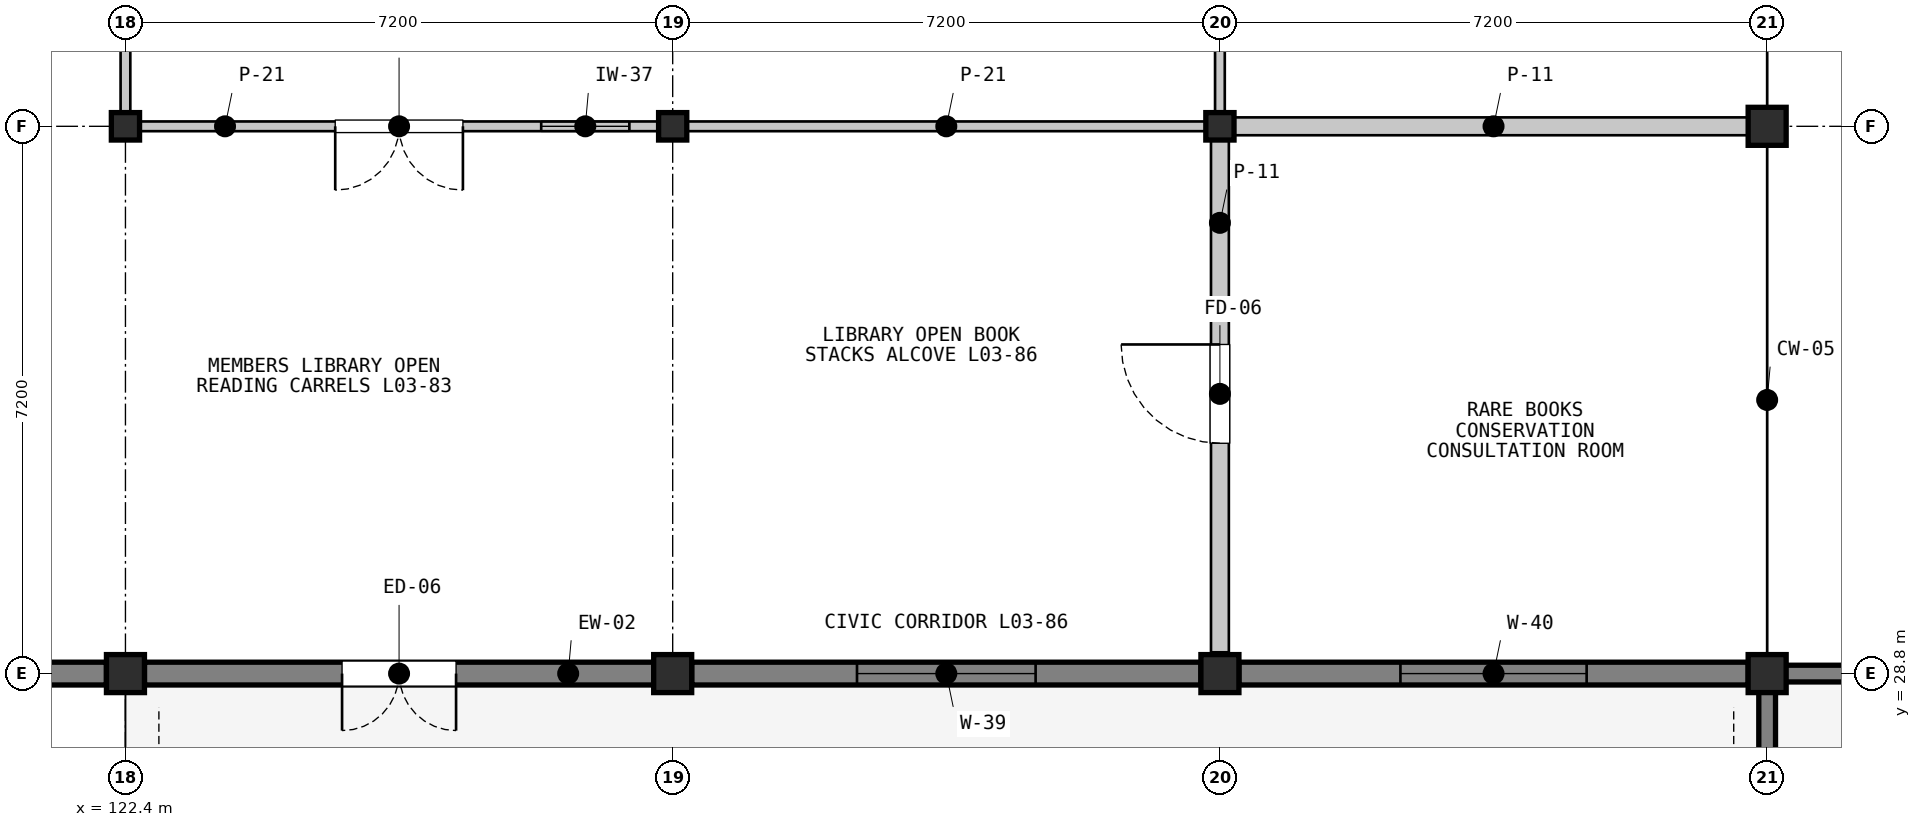
"""IFC4 building model, lengths in metres.
Left out: names, types, materials, properties, quantities, classifications, styles, units other than length and angle.
Written with IfcOpenShell. Run it as: python <this file> out.ifc"""

import sys

from ifc_helpers import new_model, si_unit, direction, frame, frame_2d, origin, origin_2d, place, context, subcontext, project, spatial, rectangle, i_section, extrude, element, fill, save


model = new_model("IFC4")
c1 = context("Model", 3, precision=1e-05, world=origin(), true_north=direction((0.0, 1.0)))
c2 = subcontext(c1, "Body", "Model", "MODEL_VIEW")
j1 = project(units=[si_unit("LENGTHUNIT", "METRE"), si_unit("PLANEANGLEUNIT", "RADIAN")], contexts=[c1])
p1 = place(None, origin())
s1 = spatial("IfcSite", under=j1, at=p1, CompositionType="ELEMENT")
p2 = place(p1, origin())
s2 = spatial("IfcBuilding", under=s1, at=p2, CompositionType="ELEMENT")
p3 = place(p2, frame((0.0, 0.0, 9.9)))
s3 = spatial("IfcBuildingStorey", under=s2, at=p3, CompositionType="ELEMENT", Elevation=9.9)
p4 = place(p3, frame((122.4, 28.8, 0.0), z_axis=(0.0, 0.0, 1.0), x_axis=(1.0, 0.0, 0.0)))
e1 = element("IfcColumn", 1, at=p4, inside=s3, PredefinedType="COLUMN", context=c2, shape_type="SweptSolid", body=[
    extrude(rectangle(XDim=0.5, YDim=0.5, at=origin_2d()), origin(), (0.0, 0.0, 1.0), 4.2),
])
p5 = place(p3, frame((122.4, 36.0, 0.0), z_axis=(0.0, 0.0, 1.0), x_axis=(1.0, 0.0, 0.0)))
e2 = element("IfcColumn", 2, at=p5, inside=s3, PredefinedType="COLUMN", context=c2, shape_type="SweptSolid", body=[
    extrude(i_section(OverallWidth=0.371, OverallDepth=0.361, WebThickness=0.012, FlangeThickness=0.02, FilletRadius=0.015, at=origin_2d()), origin(), (0.0, 0.0, 1.0), 4.2),
])
p6 = place(p3, frame((129.6, 28.8, 0.0), z_axis=(0.0, 0.0, 1.0), x_axis=(1.0, 0.0, 0.0)))
e3 = element("IfcColumn", 3, at=p6, inside=s3, PredefinedType="COLUMN", context=c2, shape_type="SweptSolid", body=[
    extrude(rectangle(XDim=0.5, YDim=0.5, at=origin_2d()), origin(), (0.0, 0.0, 1.0), 4.2),
])
p7 = place(p3, frame((129.6, 36.0, 0.0), z_axis=(0.0, 0.0, 1.0), x_axis=(1.0, 0.0, 0.0)))
e4 = element("IfcColumn", 4, at=p7, inside=s3, PredefinedType="COLUMN", context=c2, shape_type="SweptSolid", body=[
    extrude(i_section(OverallWidth=0.371, OverallDepth=0.361, WebThickness=0.012, FlangeThickness=0.02, FilletRadius=0.015, at=origin_2d()), origin(), (0.0, 0.0, 1.0), 4.2),
])
p8 = place(p3, frame((136.8, 28.8, 0.0), z_axis=(0.0, 0.0, 1.0), x_axis=(1.0, 0.0, 0.0)))
e5 = element("IfcColumn", 5, at=p8, inside=s3, PredefinedType="COLUMN", context=c2, shape_type="SweptSolid", body=[
    extrude(rectangle(XDim=0.5, YDim=0.5, at=origin_2d()), origin(), (0.0, 0.0, 1.0), 4.2),
])
p9 = place(p3, frame((136.8, 36.0, 0.0), z_axis=(0.0, 0.0, 1.0), x_axis=(1.0, 0.0, 0.0)))
e6 = element("IfcColumn", 6, at=p9, inside=s3, PredefinedType="COLUMN", context=c2, shape_type="SweptSolid", body=[
    extrude(i_section(OverallWidth=0.371, OverallDepth=0.361, WebThickness=0.012, FlangeThickness=0.02, FilletRadius=0.015, at=origin_2d()), origin(), (0.0, 0.0, 1.0), 4.2),
])
for number, where, z_axis, x_axis in (
    (7, (144.0, 28.8, 0.0), (0.0, 0.0, 1.0), (1.0, 0.0, 0.0)),
    (8, (144.0, 36.0, 0.0), (0.0, 0.0, 1.0), (1.0, 0.0, 0.0)),
):
    element("IfcColumn", number, at=place(p3, frame(where, z_axis=z_axis, x_axis=x_axis)), inside=s3, PredefinedType="COLUMN", context=c2, shape_type="SweptSolid", body=[
        extrude(rectangle(XDim=0.5, YDim=0.5, at=origin_2d()), origin(), (0.0, 0.0, 1.0), 4.2),
    ])
p10 = place(p3, frame((122.15, 28.8, 0.0), z_axis=(0.0, 0.0, 1.0), x_axis=(-1.0, 0.0, 0.0)))
e9 = element("IfcWall", 9, at=p10, inside=s3, PredefinedType="SOLIDWALL", context=c2, shape_type="SweptSolid", body=[
    extrude(rectangle(XDim=6.7, YDim=0.3, at=frame_2d((3.35, 0.0))), origin(), (0.0, 0.0, 1.0), 3.398),
])
p11 = place(p10, frame((1.008, 0.0, 0.95)))
e10 = element("IfcOpeningElement", 10, at=p11, cuts=e9, PredefinedType="OPENING", context=c2, shape_type="SweptSolid", body=[
    extrude(rectangle(XDim=1.2, YDim=1.7, at=frame_2d((0.6, 0.85))), frame((0.0, 0.16, 0.0), z_axis=(0.0, -1.0, 0.0), x_axis=(1.0, 0.0, 0.0)), (0.0, 0.0, 1.0), 0.32),
])
p12 = place(p10, frame((4.492, 0.0, 0.95)))
e11 = element("IfcOpeningElement", 11, at=p12, cuts=e9, PredefinedType="OPENING", context=c2, shape_type="SweptSolid", body=[
    extrude(rectangle(XDim=1.2, YDim=1.7, at=frame_2d((0.6, 0.85))), frame((0.0, 0.16, 0.0), z_axis=(0.0, -1.0, 0.0), x_axis=(1.0, 0.0, 0.0)), (0.0, 0.0, 1.0), 0.32),
])
p13 = place(p3, frame((129.35, 28.8, 0.0), z_axis=(0.0, 0.0, 1.0), x_axis=(-1.0, 0.0, 0.0)))
e12 = element("IfcWall", 12, at=p13, inside=s3, PredefinedType="SOLIDWALL", context=c2, shape_type="SweptSolid", body=[
    extrude(rectangle(XDim=6.7, YDim=0.3, at=frame_2d((3.35, 0.0))), origin(), (0.0, 0.0, 1.0), 3.388),
])
p14 = place(p13, frame((2.6, 0.0, 0.0)))
e13 = element("IfcOpeningElement", 13, at=p14, cuts=e12, PredefinedType="OPENING", context=c2, shape_type="SweptSolid", body=[
    extrude(rectangle(XDim=1.5, YDim=2.25, at=frame_2d((0.75, 1.125))), frame((0.0, 0.16, 0.0), z_axis=(0.0, -1.0, 0.0), x_axis=(1.0, 0.0, 0.0)), (0.0, 0.0, 1.0), 0.32),
])
p15 = place(p3, frame((136.55, 28.8, 0.0), z_axis=(0.0, 0.0, 1.0), x_axis=(-1.0, 0.0, 0.0)))
e14 = element("IfcWall", 14, at=p15, inside=s3, PredefinedType="SOLIDWALL", context=c2, shape_type="SweptSolid", body=[
    extrude(rectangle(XDim=6.7, YDim=0.3, at=frame_2d((3.35, 0.0))), origin(), (0.0, 0.0, 1.0), 3.388),
])
p16 = place(p15, frame((2.175, 0.0, 0.95)))
e15 = element("IfcOpeningElement", 15, at=p16, cuts=e14, PredefinedType="OPENING", context=c2, shape_type="SweptSolid", body=[
    extrude(rectangle(XDim=2.35, YDim=2.05, at=frame_2d((1.175, 1.025))), frame((0.0, 0.16, 0.0), z_axis=(0.0, -1.0, 0.0), x_axis=(1.0, 0.0, 0.0)), (0.0, 0.0, 1.0), 0.32),
])
p17 = place(p3, frame((143.75, 28.8, 0.0), z_axis=(0.0, 0.0, 1.0), x_axis=(-1.0, 0.0, 0.0)))
e16 = element("IfcWall", 16, at=p17, inside=s3, PredefinedType="SOLIDWALL", context=c2, shape_type="SweptSolid", body=[
    extrude(rectangle(XDim=6.7, YDim=0.3, at=frame_2d((3.35, 0.0))), origin(), (0.0, 0.0, 1.0), 3.388),
])
p18 = place(p17, frame((2.125, 0.0, 0.95)))
e17 = element("IfcOpeningElement", 17, at=p18, cuts=e16, PredefinedType="OPENING", context=c2, shape_type="SweptSolid", body=[
    extrude(rectangle(XDim=2.45, YDim=2.05, at=frame_2d((1.225, 1.025))), frame((0.0, 0.16, 0.0), z_axis=(0.0, -1.0, 0.0), x_axis=(1.0, 0.0, 0.0)), (0.0, 0.0, 1.0), 0.32),
])
p19 = place(p3, frame((144.0, 21.75, 0.0), z_axis=(0.0, 0.0, 1.0), x_axis=(0.0, 1.0, 0.0)))
e18 = element("IfcWall", 18, at=p19, inside=s3, PredefinedType="PARAPET", context=c2, shape_type="SweptSolid", body=[
    extrude(rectangle(XDim=6.9, YDim=0.22, at=frame_2d((3.45, 0.0))), origin(), (0.0, 0.0, 1.0), 0.85),
])
p20 = place(p3, frame((144.15, 28.8, 0.0), z_axis=(0.0, 0.0, 1.0), x_axis=(1.0, 0.0, 0.0)))
e19 = element("IfcWall", 19, at=p20, inside=s3, PredefinedType="PARAPET", context=c2, shape_type="SweptSolid", body=[
    extrude(rectangle(XDim=6.9, YDim=0.22, at=frame_2d((3.45, 0.0))), origin(), (0.0, 0.0, 1.0), 0.85),
])
p21 = place(p3, frame((129.48, 36.0, 0.0), z_axis=(0.0, 0.0, 1.0), x_axis=(-1.0, 0.0, 0.0)))
e20 = element("IfcWall", 20, at=p21, inside=s3, PredefinedType="PARTITIONING", context=c2, shape_type="SweptSolid", body=[
    extrude(rectangle(XDim=6.96, YDim=0.128, at=frame_2d((3.48, 0.0))), origin(), (0.0, 0.0, 1.0), 3.378),
])
p22 = place(p21, frame((2.64, 0.0, 0.0)))
e21 = element("IfcOpeningElement", 21, at=p22, cuts=e20, PredefinedType="OPENING", context=c2, shape_type="SweptSolid", body=[
    extrude(rectangle(XDim=1.68, YDim=2.35, at=frame_2d((0.84, 1.175))), frame((0.0, 0.074, 0.0), z_axis=(0.0, -1.0, 0.0), x_axis=(1.0, 0.0, 0.0)), (0.0, 0.0, 1.0), 0.148),
])
p23 = place(p21, frame((0.45, 0.0, 1.05)))
e22 = element("IfcOpeningElement", 22, at=p23, cuts=e20, PredefinedType="OPENING", context=c2, shape_type="SweptSolid", body=[
    extrude(rectangle(XDim=1.16, YDim=1.1, at=frame_2d((0.58, 0.55))), frame((0.0, 0.074, 0.0), z_axis=(0.0, -1.0, 0.0), x_axis=(1.0, 0.0, 0.0)), (0.0, 0.0, 1.0), 0.148),
])
p24 = place(p3, frame((136.68, 36.0, 0.0), z_axis=(0.0, 0.0, 1.0), x_axis=(-1.0, 0.0, 0.0)))
e23 = element("IfcWall", 23, at=p24, inside=s3, PredefinedType="PARTITIONING", context=c2, shape_type="SweptSolid", body=[
    extrude(rectangle(XDim=6.96, YDim=0.128, at=frame_2d((3.48, 0.0))), origin(), (0.0, 0.0, 1.0), 3.378),
])
for number, where, z_axis, x_axis in (
    (24, (122.4, 36.12, 0.0), (0.0, 0.0, 1.0), (0.0, 1.0, 0.0)),
    (25, (136.8, 42.92, 0.0), (0.0, 0.0, 1.0), (0.0, -1.0, 0.0)),
):
    element("IfcWall", number, at=place(p3, frame(where, z_axis=z_axis, x_axis=x_axis)), inside=s3, PredefinedType="PARTITIONING", context=c2, shape_type="SweptSolid", body=[
        extrude(rectangle(XDim=6.8, YDim=0.128, at=frame_2d((3.4, 0.0))), origin(), (0.0, 0.0, 1.0), 3.378),
    ])
p25 = place(p3, frame((136.8, 29.08, 0.0), z_axis=(0.0, 0.0, 1.0), x_axis=(0.0, 1.0, 0.0)))
e26 = element("IfcWall", 26, at=p25, inside=s3, PredefinedType="PARTITIONING", context=c2, shape_type="SweptSolid", body=[
    extrude(rectangle(XDim=6.8, YDim=0.235, at=frame_2d((3.4, 0.0))), origin(), (0.0, 0.0, 1.0), 3.378),
])
p26 = place(p25, frame((2.75, 0.0, 0.0)))
e27 = element("IfcOpeningElement", 27, at=p26, cuts=e26, PredefinedType="OPENING", context=c2, shape_type="SweptSolid", body=[
    extrude(rectangle(XDim=1.3, YDim=2.2, at=frame_2d((0.65, 1.1))), frame((0.0, 0.127, 0.0), z_axis=(0.0, -1.0, 0.0), x_axis=(1.0, 0.0, 0.0)), (0.0, 0.0, 1.0), 0.255),
])
p27 = place(p3, frame((136.92, 36.0, 0.0), z_axis=(0.0, 0.0, 1.0), x_axis=(1.0, 0.0, 0.0)))
e28 = element("IfcWall", 28, at=p27, inside=s3, PredefinedType="PARTITIONING", context=c2, shape_type="SweptSolid", body=[
    extrude(rectangle(XDim=6.96, YDim=0.235, at=frame_2d((3.48, 0.0))), origin(), (0.0, 0.0, 1.0), 3.378),
])
p28 = place(p14, origin())
e29 = element("IfcDoor", 29, at=p28, inside=s3, OperationType="DOUBLE_DOOR_SINGLE_SWING", PredefinedType="DOOR", context=c2, shape_type="SweptSolid", body=[
    extrude(rectangle(XDim=1.5, YDim=2.25, at=frame_2d((0.75, 1.125))), frame((0.0, 0.025, 0.0), z_axis=(0.0, -1.0, 0.0), x_axis=(1.0, 0.0, 0.0)), (0.0, 0.0, 1.0), 0.05),
])
fill(e13, e29)
p29 = place(p16, origin())
e30 = element("IfcWindow", 30, at=p29, inside=s3, PartitioningType="SINGLE_PANEL", PredefinedType="WINDOW", context=c2, shape_type="SweptSolid", body=[
    extrude(rectangle(XDim=2.35, YDim=2.05, at=frame_2d((1.175, 1.025))), frame((0.0, 0.03, 0.0), z_axis=(0.0, -1.0, 0.0), x_axis=(1.0, 0.0, 0.0)), (0.0, 0.0, 1.0), 0.06),
])
fill(e15, e30)
p30 = place(p18, origin())
e31 = element("IfcWindow", 31, at=p30, inside=s3, PartitioningType="SINGLE_PANEL", PredefinedType="WINDOW", context=c2, shape_type="SweptSolid", body=[
    extrude(rectangle(XDim=2.45, YDim=2.05, at=frame_2d((1.225, 1.025))), frame((0.0, 0.03, 0.0), z_axis=(0.0, -1.0, 0.0), x_axis=(1.0, 0.0, 0.0)), (0.0, 0.0, 1.0), 0.06),
])
fill(e17, e31)
p31 = place(p22, origin())
e32 = element("IfcDoor", 32, at=p31, inside=s3, OperationType="DOUBLE_DOOR_SINGLE_SWING", PredefinedType="DOOR", context=c2, shape_type="SweptSolid", body=[
    extrude(rectangle(XDim=1.68, YDim=2.35, at=frame_2d((0.84, 1.175))), frame((0.0, 0.025, 0.0), z_axis=(0.0, -1.0, 0.0), x_axis=(1.0, 0.0, 0.0)), (0.0, 0.0, 1.0), 0.05),
])
fill(e21, e32)
p32 = place(p23, origin())
e33 = element("IfcWindow", 33, at=p32, inside=s3, PartitioningType="SINGLE_PANEL", PredefinedType="WINDOW", context=c2, shape_type="SweptSolid", body=[
    extrude(rectangle(XDim=1.16, YDim=1.1, at=frame_2d((0.58, 0.55))), frame((0.0, 0.03, 0.0), z_axis=(0.0, -1.0, 0.0), x_axis=(1.0, 0.0, 0.0)), (0.0, 0.0, 1.0), 0.06),
])
fill(e22, e33)
p33 = place(p26, origin())
e34 = element("IfcDoor", 34, at=p33, inside=s3, OperationType="SINGLE_SWING_RIGHT", PredefinedType="DOOR", context=c2, shape_type="SweptSolid", body=[
    extrude(rectangle(XDim=1.3, YDim=2.2, at=frame_2d((0.65, 1.1))), frame((0.0, 0.025, 0.0), z_axis=(0.0, -1.0, 0.0), x_axis=(1.0, 0.0, 0.0)), (0.0, 0.0, 1.0), 0.05),
])
fill(e27, e34)
save(model, sys.argv[1])
